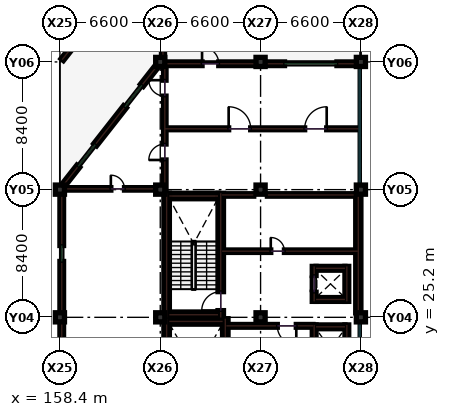
"""IFC4 building model, lengths in metres.
Left out: names, types, materials, properties, quantities, classifications, styles, units other than length and angle.
Written with IfcOpenShell. Run it as: python <this file> out.ifc"""

import sys

from ifc_helpers import new_model, si_unit, direction, frame, frame_2d, origin, origin_2d, place, context, subcontext, project, spatial, rectangle, extrude, element, fill, save


model = new_model("IFC4")
c1 = context("Model", 3, precision=1e-05, world=origin(), true_north=direction((0.0, 1.0)))
c2 = subcontext(c1, "Body", "Model", "MODEL_VIEW")
j1 = project(units=[si_unit("LENGTHUNIT", "METRE"), si_unit("PLANEANGLEUNIT", "RADIAN")], contexts=[c1])
p1 = place(None, origin())
s1 = spatial("IfcSite", under=j1, at=p1, CompositionType="ELEMENT")
p2 = place(p1, origin())
s2 = spatial("IfcBuilding", under=s1, at=p2, CompositionType="ELEMENT")
p3 = place(p2, frame((0.0, 0.0, 39.3)))
s3 = spatial("IfcBuildingStorey", under=s2, at=p3, CompositionType="ELEMENT", Elevation=39.3)
for number, where, z_axis, x_axis in (
    (1, (158.4, 25.2, 0.0), (0.0, 0.0, 1.0), (1.0, 0.0, 0.0)),
    (2, (158.4, 33.6, 0.0), (0.0, 0.0, 1.0), (1.0, 0.0, 0.0)),
    (3, (165.0, 25.2, 0.0), (0.0, 0.0, 1.0), (1.0, 0.0, 0.0)),
    (4, (165.0, 33.6, 0.0), (0.0, 0.0, 1.0), (1.0, 0.0, 0.0)),
    (5, (165.0, 42.0, 0.0), (0.0, 0.0, 1.0), (1.0, 0.0, 0.0)),
    (6, (171.6, 25.2, 0.0), (0.0, 0.0, 1.0), (1.0, 0.0, 0.0)),
    (7, (171.6, 33.6, 0.0), (0.0, 0.0, 1.0), (1.0, 0.0, 0.0)),
    (8, (171.6, 42.0, 0.0), (0.0, 0.0, 1.0), (1.0, 0.0, 0.0)),
    (9, (178.2, 25.2, 0.0), (0.0, 0.0, 1.0), (1.0, 0.0, 0.0)),
    (10, (178.2, 33.6, 0.0), (0.0, 0.0, 1.0), (1.0, 0.0, 0.0)),
    (11, (178.2, 42.0, 0.0), (0.0, 0.0, 1.0), (1.0, 0.0, 0.0)),
):
    element("IfcColumn", number, at=place(p3, frame(where, z_axis=z_axis, x_axis=x_axis)), inside=s3, PredefinedType="COLUMN", context=c2, shape_type="SweptSolid", body=[
        extrude(rectangle(XDim=0.6, YDim=0.6, at=origin_2d()), origin(), (0.0, 0.0, 1.0), 3.9),
    ])
p4 = place(p3, frame((165.3, 33.65, 0.0), z_axis=(0.0, 0.0, 1.0), x_axis=(0.0, 1.0, 0.0)))
e12 = element("IfcWall", 12, at=p4, inside=s3, PredefinedType="PARTITIONING", context=c2, shape_type="SweptSolid", body=[
    extrude(rectangle(XDim=8.1, YDim=0.16, at=frame_2d((4.05, 0.0))), origin(), (0.0, 0.0, 1.0), 2.93),
])
p5 = place(p4, frame((1.9, 0.0, 0.0)))
e13 = element("IfcOpeningElement", 13, at=p5, cuts=e12, PredefinedType="OPENING", context=c2, shape_type="SweptSolid", body=[
    extrude(rectangle(XDim=1.05, YDim=2.15, at=frame_2d((0.525, 1.075))), frame((0.0, 0.09, 0.0), z_axis=(0.0, -1.0, 0.0), x_axis=(1.0, 0.0, 0.0)), (0.0, 0.0, 1.0), 0.18),
])
p6 = place(p4, frame((6.1, 0.0, 0.0)))
e14 = element("IfcOpeningElement", 14, at=p6, cuts=e12, PredefinedType="OPENING", context=c2, shape_type="SweptSolid", body=[
    extrude(rectangle(XDim=1.05, YDim=2.15, at=frame_2d((0.525, 1.075))), frame((0.0, 0.09, 0.0), z_axis=(0.0, -1.0, 0.0), x_axis=(1.0, 0.0, 0.0)), (0.0, 0.0, 1.0), 0.18),
])
p7 = place(p3, frame((158.55, 33.65, 0.0), z_axis=(0.0, 0.0, 1.0), x_axis=(1.0, 0.0, 0.0)))
e15 = element("IfcWall", 15, at=p7, inside=s3, PredefinedType="PARTITIONING", context=c2, shape_type="SweptSolid", body=[
    extrude(rectangle(XDim=6.75, YDim=0.16, at=frame_2d((3.375, 0.0))), origin(), (0.0, 0.0, 1.0), 2.93),
])
p8 = place(p7, frame((3.2, 0.0, 0.0)))
e16 = element("IfcOpeningElement", 16, at=p8, cuts=e15, PredefinedType="OPENING", context=c2, shape_type="SweptSolid", body=[
    extrude(rectangle(XDim=0.9, YDim=2.1, at=frame_2d((0.45, 1.05))), frame((0.0, 0.09, 0.0), z_axis=(0.0, -1.0, 0.0), x_axis=(1.0, 0.0, 0.0)), (0.0, 0.0, 1.0), 0.18),
])
p9 = place(p3, frame((165.3, 37.6, 0.0), z_axis=(0.0, 0.0, 1.0), x_axis=(1.0, 0.0, 0.0)))
e17 = element("IfcWall", 17, at=p9, inside=s3, PredefinedType="PARTITIONING", context=c2, shape_type="SweptSolid", body=[
    extrude(rectangle(XDim=12.75, YDim=0.12, at=frame_2d((6.375, 0.0))), origin(), (0.0, 0.0, 1.0), 2.93),
])
p10 = place(p9, frame((4.2, 0.0, 0.0)))
e18 = element("IfcOpeningElement", 18, at=p10, cuts=e17, PredefinedType="OPENING", context=c2, shape_type="SweptSolid", body=[
    extrude(rectangle(XDim=1.45, YDim=2.25, at=frame_2d((0.725, 1.125))), frame((0.0, 0.07, 0.0), z_axis=(0.0, -1.0, 0.0), x_axis=(1.0, 0.0, 0.0)), (0.0, 0.0, 1.0), 0.14),
])
p11 = place(p9, frame((9.2, 0.0, 0.0)))
e19 = element("IfcOpeningElement", 19, at=p11, cuts=e17, PredefinedType="OPENING", context=c2, shape_type="SweptSolid", body=[
    extrude(rectangle(XDim=1.45, YDim=2.25, at=frame_2d((0.725, 1.125))), frame((0.0, 0.07, 0.0), z_axis=(0.0, -1.0, 0.0), x_axis=(1.0, 0.0, 0.0)), (0.0, 0.0, 1.0), 0.14),
])
p12 = place(p3, frame((169.07, 29.55, 0.0), z_axis=(0.0, 0.0, 1.0), x_axis=(1.0, 0.0, 0.0)))
e20 = element("IfcWall", 20, at=p12, inside=s3, PredefinedType="PARTITIONING", context=c2, shape_type="SweptSolid", body=[
    extrude(rectangle(XDim=8.93, YDim=0.16, at=frame_2d((4.465, 0.0))), origin(), (0.0, 0.0, 1.0), 2.93),
])
p13 = place(p12, frame((3.2, 0.0, 0.0)))
e21 = element("IfcOpeningElement", 21, at=p13, cuts=e20, PredefinedType="OPENING", context=c2, shape_type="SweptSolid", body=[
    extrude(rectangle(XDim=0.9, YDim=2.1, at=frame_2d((0.45, 1.05))), frame((0.0, 0.09, 0.0), z_axis=(0.0, -1.0, 0.0), x_axis=(1.0, 0.0, 0.0)), (0.0, 0.0, 1.0), 0.18),
])
p14 = place(p3, frame((169.07, 33.25, 0.0), z_axis=(0.0, 0.0, 1.0), x_axis=(1.0, 0.0, 0.0)))
e22 = element("IfcWall", 22, at=p14, inside=s3, PredefinedType="PARTITIONING", context=c2, shape_type="SweptSolid", body=[
    extrude(rectangle(XDim=2.08, YDim=0.16, at=frame_2d((1.04, 0.0))), origin(), (0.0, 0.0, 1.0), 2.93),
])
p15 = place(p3, frame((172.05, 33.25, 0.0), z_axis=(0.0, 0.0, 1.0), x_axis=(1.0, 0.0, 0.0)))
e23 = element("IfcWall", 23, at=p15, inside=s3, PredefinedType="PARTITIONING", context=c2, shape_type="SweptSolid", body=[
    extrude(rectangle(XDim=5.95, YDim=0.16, at=frame_2d((2.975, 0.0))), origin(), (0.0, 0.0, 1.0), 2.93),
])
p16 = place(p3, frame((158.52, 24.905, 0.0), z_axis=(0.0, 0.0, 1.0), x_axis=(0.0, -1.0, 0.0)))
e24 = element("IfcWall", 24, at=p16, inside=s3, PredefinedType="SOLIDWALL", context=c2, shape_type="SweptSolid", body=[
    extrude(rectangle(XDim=7.81, YDim=0.24, at=frame_2d((3.905, 0.0))), origin(), (0.0, 0.0, 1.0), 2.965),
])
p17 = place(p3, frame((158.52, 33.305, 0.0), z_axis=(0.0, 0.0, 1.0), x_axis=(0.0, -1.0, 0.0)))
e25 = element("IfcWall", 25, at=p17, inside=s3, PredefinedType="SOLIDWALL", context=c2, shape_type="SweptSolid", body=[
    extrude(rectangle(XDim=7.81, YDim=0.24, at=frame_2d((3.905, 0.0))), origin(), (0.0, 0.0, 1.0), 3.115),
])
p18 = place(p17, frame((3.38, 0.0, 0.95)))
e26 = element("IfcOpeningElement", 26, at=p18, cuts=e25, PredefinedType="OPENING", context=c2, shape_type="SweptSolid", body=[
    extrude(rectangle(XDim=1.05, YDim=1.75, at=frame_2d((0.525, 0.875))), frame((0.0, 0.13, 0.0), z_axis=(0.0, -1.0, 0.0), x_axis=(1.0, 0.0, 0.0)), (0.0, 0.0, 1.0), 0.26),
])
p19 = place(p3, frame((171.305, 41.88, 0.0), z_axis=(0.0, 0.0, 1.0), x_axis=(-1.0, 0.0, 0.0)))
e27 = element("IfcWall", 27, at=p19, inside=s3, PredefinedType="SOLIDWALL", context=c2, shape_type="SweptSolid", body=[
    extrude(rectangle(XDim=6.01, YDim=0.24, at=frame_2d((3.005, 0.0))), origin(), (0.0, 0.0, 1.0), 3.015),
])
p20 = place(p19, frame((2.455, 0.0, 0.0)))
e28 = element("IfcOpeningElement", 28, at=p20, cuts=e27, PredefinedType="OPENING", context=c2, shape_type="SweptSolid", body=[
    extrude(rectangle(XDim=1.1, YDim=2.2, at=frame_2d((0.55, 1.1))), frame((0.0, 0.13, 0.0), z_axis=(0.0, -1.0, 0.0), x_axis=(1.0, 0.0, 0.0)), (0.0, 0.0, 1.0), 0.26),
])
p21 = place(p3, frame((178.03, 25.495, 0.0), z_axis=(0.0, 0.0, 1.0), x_axis=(0.0, 1.0, 0.0)))
e29 = element("IfcWall", 29, at=p21, inside=s3, PredefinedType="SHEAR", context=c2, shape_type="SweptSolid", body=[
    extrude(rectangle(XDim=7.81, YDim=0.34, at=frame_2d((3.905, 0.0))), origin(), (0.0, 0.0, 1.0), 3.68),
])
p22 = place(p3, frame((177.905, 41.88, 0.0), z_axis=(0.0, 0.0, 1.0), x_axis=(-1.0, 0.0, 0.0)))
e30 = element("IfcWall", 30, at=p22, inside=s3, PredefinedType="SOLIDWALL", context=c2, shape_type="SweptSolid", body=[
    extrude(rectangle(XDim=6.01, YDim=0.24, at=frame_2d((3.005, 0.0))), origin(), (0.0, 0.0, 1.0), 3.015),
])
p23 = place(p22, frame((1.28, 0.0, 0.95)))
e31 = element("IfcOpeningElement", 31, at=p23, cuts=e30, PredefinedType="OPENING", context=c2, shape_type="SweptSolid", body=[
    extrude(rectangle(XDim=3.45, YDim=1.7, at=frame_2d((1.725, 0.85))), frame((0.0, 0.13, 0.0), z_axis=(0.0, -1.0, 0.0), x_axis=(1.0, 0.0, 0.0)), (0.0, 0.0, 1.0), 0.26),
])
p24 = place(p3, frame((158.62, 33.88, 0.0), z_axis=(0.0, 0.0, 1.0), x_axis=(0.617811819191, 0.786325985878, 0.0)))
e32 = element("IfcWall", 32, at=p24, inside=s3, PredefinedType="SOLIDWALL", context=c2, shape_type="SweptSolid", body=[
    extrude(rectangle(XDim=9.97, YDim=0.24, at=frame_2d((4.985, 0.0))), origin(), (0.0, 0.0, 1.0), 3.065),
])
p25 = place(p24, frame((1.6, 0.0, 0.95)))
e33 = element("IfcOpeningElement", 33, at=p25, cuts=e32, PredefinedType="OPENING", context=c2, shape_type="SweptSolid", body=[
    extrude(rectangle(XDim=1.8, YDim=1.6, at=frame_2d((0.9, 0.8))), frame((0.0, 0.13, 0.0), z_axis=(0.0, -1.0, 0.0), x_axis=(1.0, 0.0, 0.0)), (0.0, 0.0, 1.0), 0.26),
])
p26 = place(p24, frame((6.57, 0.0, 0.95)))
e34 = element("IfcOpeningElement", 34, at=p26, cuts=e32, PredefinedType="OPENING", context=c2, shape_type="SweptSolid", body=[
    extrude(rectangle(XDim=1.8, YDim=1.6, at=frame_2d((0.9, 0.8))), frame((0.0, 0.13, 0.0), z_axis=(0.0, -1.0, 0.0), x_axis=(1.0, 0.0, 0.0)), (0.0, 0.0, 1.0), 0.26),
])
p27 = place(p3, frame((158.55, 42.15, 0.0), z_axis=(0.0, 0.0, 1.0), x_axis=(0.616949570593, 0.787002685729, 0.0)))
e35 = element("IfcWall", 35, at=p27, inside=s3, PredefinedType="PARAPET", context=c2, shape_type="SweptSolid", body=[
    extrude(rectangle(XDim=10.292, YDim=0.2, at=frame_2d((5.146, 0.0))), origin(), (0.0, 0.0, 1.0), 1.1),
])
p28 = place(p3, frame((165.18, 42.05, 0.0), z_axis=(0.0, 0.0, 1.0), x_axis=(0.0, 1.0, 0.0)))
e36 = element("IfcWall", 36, at=p28, inside=s3, PredefinedType="PARAPET", context=c2, shape_type="SweptSolid", body=[
    extrude(rectangle(XDim=8.3, YDim=0.2, at=frame_2d((4.15, 0.0))), origin(), (0.0, 0.0, 1.0), 1.1),
])
p29 = place(p3, frame((165.42, 16.74, 0.0), z_axis=(0.0, 0.0, 1.0), x_axis=(0.0, 1.0, 0.0)))
e37 = element("IfcWall", 37, at=p29, inside=s3, PredefinedType="SHEAR", context=c2, shape_type="SweptSolid", body=[
    extrude(rectangle(XDim=8.37, YDim=0.36, at=frame_2d((4.185, 0.0))), origin(), (0.0, 0.0, 1.0), 3.68),
])
p30 = place(p3, frame((169.28, 16.74, 0.0), z_axis=(0.0, 0.0, 1.0), x_axis=(0.0, 1.0, 0.0)))
e38 = element("IfcWall", 38, at=p30, inside=s3, PredefinedType="SHEAR", context=c2, shape_type="SweptSolid", body=[
    extrude(rectangle(XDim=8.37, YDim=0.36, at=frame_2d((4.185, 0.0))), origin(), (0.0, 0.0, 1.0), 3.68),
])
p31 = place(p30, frame((0.45, 0.0, 0.0)))
e39 = element("IfcOpeningElement", 39, at=p31, cuts=e38, PredefinedType="OPENING", context=c2, shape_type="SweptSolid", body=[
    extrude(rectangle(XDim=1.25, YDim=2.15, at=frame_2d((0.625, 1.075))), frame((0.0, 0.19, 0.0), z_axis=(0.0, -1.0, 0.0), x_axis=(1.0, 0.0, 0.0)), (0.0, 0.0, 1.0), 0.38),
])
p32 = place(p3, frame((165.6, 24.93, 0.0), z_axis=(0.0, 0.0, 1.0), x_axis=(1.0, 0.0, 0.0)))
e40 = element("IfcWall", 40, at=p32, inside=s3, PredefinedType="SHEAR", context=c2, shape_type="SweptSolid", body=[
    extrude(rectangle(XDim=3.5, YDim=0.36, at=frame_2d((1.75, 0.0))), origin(), (0.0, 0.0, 1.0), 3.68),
])
p33 = place(p3, frame((165.42, 25.19, 0.0), z_axis=(0.0, 0.0, 1.0), x_axis=(0.0, 1.0, 0.0)))
e41 = element("IfcWall", 41, at=p33, inside=s3, PredefinedType="SHEAR", context=c2, shape_type="SweptSolid", body=[
    extrude(rectangle(XDim=8.17, YDim=0.36, at=frame_2d((4.085, 0.0))), origin(), (0.0, 0.0, 1.0), 3.68),
])
p34 = place(p3, frame((168.98, 25.19, 0.0), z_axis=(0.0, 0.0, 1.0), x_axis=(0.0, 1.0, 0.0)))
e42 = element("IfcWall", 42, at=p34, inside=s3, PredefinedType="SHEAR", context=c2, shape_type="SweptSolid", body=[
    extrude(rectangle(XDim=8.17, YDim=0.36, at=frame_2d((4.085, 0.0))), origin(), (0.0, 0.0, 1.0), 3.68),
])
p35 = place(p34, frame((0.45, 0.0, 0.0)))
e43 = element("IfcOpeningElement", 43, at=p35, cuts=e42, PredefinedType="OPENING", context=c2, shape_type="SweptSolid", body=[
    extrude(rectangle(XDim=1.25, YDim=2.15, at=frame_2d((0.625, 1.075))), frame((0.0, 0.19, 0.0), z_axis=(0.0, -1.0, 0.0), x_axis=(1.0, 0.0, 0.0)), (0.0, 0.0, 1.0), 0.38),
])
for number, where, z_axis, x_axis in (
    (44, (165.6, 33.18, 0.0), (0.0, 0.0, 1.0), (1.0, 0.0, 0.0)),
    (45, (165.6, 25.37, 0.0), (0.0, 0.0, 1.0), (1.0, 0.0, 0.0)),
):
    element("IfcWall", number, at=place(p3, frame(where, z_axis=z_axis, x_axis=x_axis)), inside=s3, PredefinedType="SHEAR", context=c2, shape_type="SweptSolid", body=[
        extrude(rectangle(XDim=3.2, YDim=0.36, at=frame_2d((1.6, 0.0))), origin(), (0.0, 0.0, 1.0), 3.68),
    ])
p36 = place(p3, frame((175.125, 21.5, 0.0), z_axis=(0.0, 0.0, 1.0), x_axis=(0.0, 1.0, 0.0)))
e46 = element("IfcWall", 46, at=p36, inside=s3, PredefinedType="SHEAR", context=c2, shape_type="SweptSolid", body=[
    extrude(rectangle(XDim=3.2, YDim=0.25, at=frame_2d((1.6, 0.0))), origin(), (0.0, 0.0, 1.0), 3.68),
])
p37 = place(p36, frame((1.05, 0.0, 0.0)))
e47 = element("IfcOpeningElement", 47, at=p37, cuts=e46, PredefinedType="OPENING", context=c2, shape_type="SweptSolid", body=[
    extrude(rectangle(XDim=1.1, YDim=2.15, at=frame_2d((0.55, 1.075))), frame((0.0, 0.135, 0.0), z_axis=(0.0, -1.0, 0.0), x_axis=(1.0, 0.0, 0.0)), (0.0, 0.0, 1.0), 0.27),
])
p38 = place(p3, frame((177.275, 21.5, 0.0), z_axis=(0.0, 0.0, 1.0), x_axis=(0.0, 1.0, 0.0)))
e48 = element("IfcWall", 48, at=p38, inside=s3, PredefinedType="SHEAR", context=c2, shape_type="SweptSolid", body=[
    extrude(rectangle(XDim=3.2, YDim=0.25, at=frame_2d((1.6, 0.0))), origin(), (0.0, 0.0, 1.0), 3.68),
])
p39 = place(p3, frame((175.25, 24.575, 0.0), z_axis=(0.0, 0.0, 1.0), x_axis=(1.0, 0.0, 0.0)))
e49 = element("IfcWall", 49, at=p39, inside=s3, PredefinedType="SHEAR", context=c2, shape_type="SweptSolid", body=[
    extrude(rectangle(XDim=1.9, YDim=0.25, at=frame_2d((0.95, 0.0))), origin(), (0.0, 0.0, 1.0), 3.68),
])
p40 = place(p3, frame((175.125, 26.25, 0.0), z_axis=(0.0, 0.0, 1.0), x_axis=(0.0, 1.0, 0.0)))
e50 = element("IfcWall", 50, at=p40, inside=s3, PredefinedType="SHEAR", context=c2, shape_type="SweptSolid", body=[
    extrude(rectangle(XDim=2.3, YDim=0.25, at=frame_2d((1.15, 0.0))), origin(), (0.0, 0.0, 1.0), 3.68),
])
p41 = place(p40, frame((0.6, 0.0, 0.0)))
e51 = element("IfcOpeningElement", 51, at=p41, cuts=e50, PredefinedType="OPENING", context=c2, shape_type="SweptSolid", body=[
    extrude(rectangle(XDim=1.1, YDim=2.15, at=frame_2d((0.55, 1.075))), frame((0.0, 0.135, 0.0), z_axis=(0.0, -1.0, 0.0), x_axis=(1.0, 0.0, 0.0)), (0.0, 0.0, 1.0), 0.27),
])
p42 = place(p3, frame((177.275, 26.25, 0.0), z_axis=(0.0, 0.0, 1.0), x_axis=(0.0, 1.0, 0.0)))
e52 = element("IfcWall", 52, at=p42, inside=s3, PredefinedType="SHEAR", context=c2, shape_type="SweptSolid", body=[
    extrude(rectangle(XDim=2.3, YDim=0.25, at=frame_2d((1.15, 0.0))), origin(), (0.0, 0.0, 1.0), 3.68),
])
for number, where, z_axis, x_axis in (
    (53, (175.25, 26.375, 0.0), (0.0, 0.0, 1.0), (1.0, 0.0, 0.0)),
    (54, (175.25, 28.425, 0.0), (0.0, 0.0, 1.0), (1.0, 0.0, 0.0)),
):
    element("IfcWall", number, at=place(p3, frame(where, z_axis=z_axis, x_axis=x_axis)), inside=s3, PredefinedType="SHEAR", context=c2, shape_type="SweptSolid", body=[
        extrude(rectangle(XDim=1.9, YDim=0.25, at=frame_2d((0.95, 0.0))), origin(), (0.0, 0.0, 1.0), 3.68),
    ])
p43 = place(p3, frame((169.35, 24.64, 0.0), z_axis=(0.0, 0.0, 1.0), x_axis=(1.0, 0.0, 0.0)))
e55 = element("IfcWall", 55, at=p43, inside=s3, PredefinedType="SOLIDWALL", context=c2, shape_type="SweptSolid", body=[
    extrude(rectangle(XDim=5.7, YDim=0.18, at=frame_2d((2.85, 0.0))), origin(), (0.0, 0.0, 1.0), 3.68),
])
p44 = place(p43, frame((3.35, 0.0, 0.0)))
e56 = element("IfcOpeningElement", 56, at=p44, cuts=e55, PredefinedType="OPENING", context=c2, shape_type="SweptSolid", body=[
    extrude(rectangle(XDim=1.25, YDim=2.15, at=frame_2d((0.625, 1.075))), frame((0.0, 0.1, 0.0), z_axis=(0.0, -1.0, 0.0), x_axis=(1.0, 0.0, 0.0)), (0.0, 0.0, 1.0), 0.2),
])
p45 = place(p5, origin())
e57 = element("IfcDoor", 57, at=p45, inside=s3, OperationType="SINGLE_SWING_LEFT", PredefinedType="DOOR", context=c2, shape_type="SweptSolid", body=[
    extrude(rectangle(XDim=1.05, YDim=2.15, at=frame_2d((0.525, 1.075))), frame((0.0, 0.025, 0.0), z_axis=(0.0, -1.0, 0.0), x_axis=(1.0, 0.0, 0.0)), (0.0, 0.0, 1.0), 0.05),
])
fill(e13, e57)
p46 = place(p6, origin())
e58 = element("IfcDoor", 58, at=p46, inside=s3, OperationType="SINGLE_SWING_RIGHT", PredefinedType="DOOR", context=c2, shape_type="SweptSolid", body=[
    extrude(rectangle(XDim=1.05, YDim=2.15, at=frame_2d((0.525, 1.075))), frame((0.0, 0.025, 0.0), z_axis=(0.0, -1.0, 0.0), x_axis=(1.0, 0.0, 0.0)), (0.0, 0.0, 1.0), 0.05),
])
fill(e14, e58)
p47 = place(p8, origin())
e59 = element("IfcDoor", 59, at=p47, inside=s3, OperationType="SINGLE_SWING_LEFT", PredefinedType="DOOR", context=c2, shape_type="SweptSolid", body=[
    extrude(rectangle(XDim=0.9, YDim=2.1, at=frame_2d((0.45, 1.05))), frame((0.0, 0.025, 0.0), z_axis=(0.0, -1.0, 0.0), x_axis=(1.0, 0.0, 0.0)), (0.0, 0.0, 1.0), 0.05),
])
fill(e16, e59)
p48 = place(p10, origin())
e60 = element("IfcDoor", 60, at=p48, inside=s3, OperationType="SINGLE_SWING_LEFT", PredefinedType="DOOR", context=c2, shape_type="SweptSolid", body=[
    extrude(rectangle(XDim=1.45, YDim=2.25, at=frame_2d((0.725, 1.125))), frame((0.0, 0.025, 0.0), z_axis=(0.0, -1.0, 0.0), x_axis=(1.0, 0.0, 0.0)), (0.0, 0.0, 1.0), 0.05),
])
fill(e18, e60)
p49 = place(p11, origin())
e61 = element("IfcDoor", 61, at=p49, inside=s3, OperationType="SINGLE_SWING_RIGHT", PredefinedType="DOOR", context=c2, shape_type="SweptSolid", body=[
    extrude(rectangle(XDim=1.45, YDim=2.25, at=frame_2d((0.725, 1.125))), frame((0.0, 0.025, 0.0), z_axis=(0.0, -1.0, 0.0), x_axis=(1.0, 0.0, 0.0)), (0.0, 0.0, 1.0), 0.05),
])
fill(e19, e61)
p50 = place(p13, origin())
e62 = element("IfcDoor", 62, at=p50, inside=s3, OperationType="SINGLE_SWING_LEFT", PredefinedType="DOOR", context=c2, shape_type="SweptSolid", body=[
    extrude(rectangle(XDim=0.9, YDim=2.1, at=frame_2d((0.45, 1.05))), frame((0.0, 0.025, 0.0), z_axis=(0.0, -1.0, 0.0), x_axis=(1.0, 0.0, 0.0)), (0.0, 0.0, 1.0), 0.05),
])
fill(e21, e62)
p51 = place(p18, origin())
e63 = element("IfcWindow", 63, at=p51, inside=s3, PartitioningType="SINGLE_PANEL", PredefinedType="WINDOW", context=c2, shape_type="SweptSolid", body=[
    extrude(rectangle(XDim=1.05, YDim=1.75, at=frame_2d((0.525, 0.875))), frame((0.0, 0.03, 0.0), z_axis=(0.0, -1.0, 0.0), x_axis=(1.0, 0.0, 0.0)), (0.0, 0.0, 1.0), 0.06),
])
fill(e26, e63)
p52 = place(p20, frame((1.1, 0.0, 0.0), z_axis=(0.0, 0.0, 1.0), x_axis=(-1.0, 0.0, 0.0)))
e64 = element("IfcDoor", 64, at=p52, inside=s3, OperationType="SINGLE_SWING_RIGHT", PredefinedType="DOOR", context=c2, shape_type="SweptSolid", body=[
    extrude(rectangle(XDim=1.1, YDim=2.2, at=frame_2d((0.55, 1.1))), frame((0.0, 0.025, 0.0), z_axis=(0.0, -1.0, 0.0), x_axis=(1.0, 0.0, 0.0)), (0.0, 0.0, 1.0), 0.05),
])
fill(e28, e64)
p53 = place(p23, origin())
e65 = element("IfcWindow", 65, at=p53, inside=s3, PartitioningType="SINGLE_PANEL", PredefinedType="WINDOW", context=c2, shape_type="SweptSolid", body=[
    extrude(rectangle(XDim=3.45, YDim=1.7, at=frame_2d((1.725, 0.85))), frame((0.0, 0.03, 0.0), z_axis=(0.0, -1.0, 0.0), x_axis=(1.0, 0.0, 0.0)), (0.0, 0.0, 1.0), 0.06),
])
fill(e31, e65)
p54 = place(p25, origin())
e66 = element("IfcWindow", 66, at=p54, inside=s3, PartitioningType="SINGLE_PANEL", PredefinedType="WINDOW", context=c2, shape_type="SweptSolid", body=[
    extrude(rectangle(XDim=1.8, YDim=1.6, at=frame_2d((0.9, 0.8))), frame((0.0, 0.03, 0.0), z_axis=(0.0, -1.0, 0.0), x_axis=(1.0, 0.0, 0.0)), (0.0, 0.0, 1.0), 0.06),
])
fill(e33, e66)
p55 = place(p26, origin())
e67 = element("IfcWindow", 67, at=p55, inside=s3, PartitioningType="SINGLE_PANEL", PredefinedType="WINDOW", context=c2, shape_type="SweptSolid", body=[
    extrude(rectangle(XDim=1.8, YDim=1.6, at=frame_2d((0.9, 0.8))), frame((0.0, 0.03, 0.0), z_axis=(0.0, -1.0, 0.0), x_axis=(1.0, 0.0, 0.0)), (0.0, 0.0, 1.0), 0.06),
])
fill(e34, e67)
p56 = place(p35, origin())
e68 = element("IfcDoor", 68, at=p56, inside=s3, OperationType="SINGLE_SWING_LEFT", PredefinedType="DOOR", context=c2, shape_type="SweptSolid", body=[
    extrude(rectangle(XDim=1.25, YDim=2.15, at=frame_2d((0.625, 1.075))), frame((0.0, 0.025, 0.0), z_axis=(0.0, -1.0, 0.0), x_axis=(1.0, 0.0, 0.0)), (0.0, 0.0, 1.0), 0.05),
])
fill(e43, e68)
p57 = place(p41, origin())
e69 = element("IfcDoor", 69, at=p57, inside=s3, OperationType="SLIDING_TO_LEFT", PredefinedType="DOOR", context=c2, shape_type="SweptSolid", body=[
    extrude(rectangle(XDim=1.1, YDim=2.15, at=frame_2d((0.55, 1.075))), frame((0.0, 0.025, 0.0), z_axis=(0.0, -1.0, 0.0), x_axis=(1.0, 0.0, 0.0)), (0.0, 0.0, 1.0), 0.05),
])
fill(e51, e69)
p58 = place(p44, frame((1.25, 0.0, 0.0), z_axis=(0.0, 0.0, 1.0), x_axis=(-1.0, 0.0, 0.0)))
e70 = element("IfcDoor", 70, at=p58, inside=s3, OperationType="SINGLE_SWING_RIGHT", PredefinedType="DOOR", context=c2, shape_type="SweptSolid", body=[
    extrude(rectangle(XDim=1.25, YDim=2.15, at=frame_2d((0.625, 1.075))), frame((0.0, 0.025, 0.0), z_axis=(0.0, -1.0, 0.0), x_axis=(1.0, 0.0, 0.0)), (0.0, 0.0, 1.0), 0.05),
])
fill(e56, e70)
save(model, sys.argv[1])
